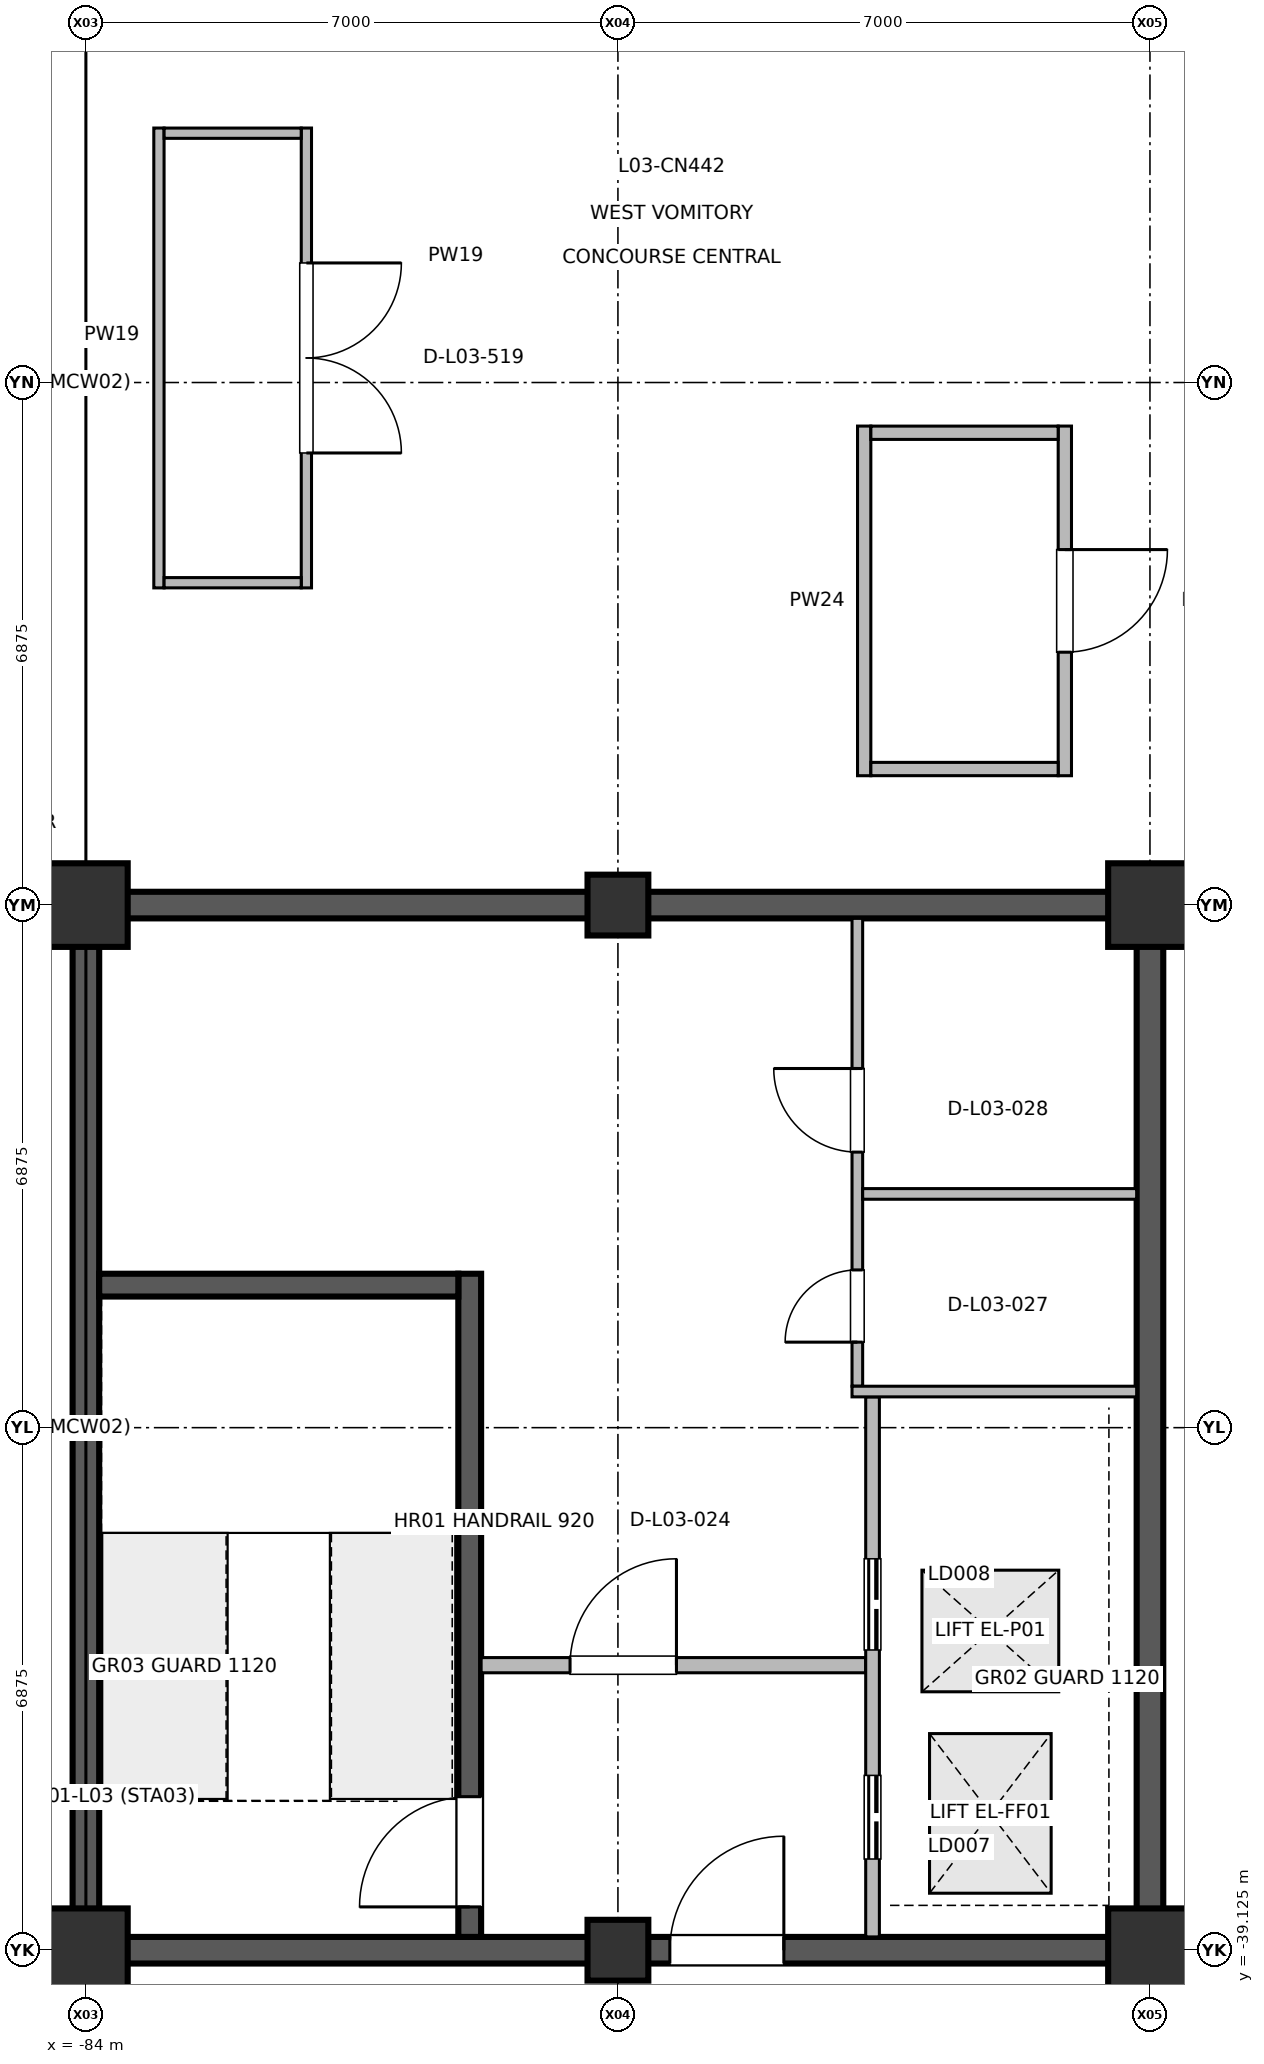
"""IFC4 building model, lengths in metres.
Left out: names, types, materials, properties, quantities, classifications, styles, units other than length and angle.
Written with IfcOpenShell. Run it as: python <this file> out.ifc"""

import sys

from ifc_helpers import new_model, si_unit, direction, frame, frame_2d, origin, origin_2d, place, context, subcontext, project, spatial, rectangle, extrude, element, fill, save


model = new_model("IFC4")
c1 = context("Model", 3, precision=1e-05, world=origin(), true_north=direction((0.0, 1.0)))
c2 = subcontext(c1, "Body", "Model", "MODEL_VIEW")
j1 = project(units=[si_unit("LENGTHUNIT", "METRE"), si_unit("PLANEANGLEUNIT", "RADIAN")], contexts=[c1])
p1 = place(None, origin())
s1 = spatial("IfcSite", under=j1, at=p1, CompositionType="ELEMENT")
p2 = place(p1, origin())
s2 = spatial("IfcBuilding", under=s1, at=p2, CompositionType="ELEMENT")
p3 = place(p2, frame((0.0, 0.0, 11.4)))
s3 = spatial("IfcBuildingStorey", under=s2, at=p3, CompositionType="ELEMENT", Elevation=11.4)
for number, where, z_axis, x_axis in (
    (1, (-84.0, -39.125, 0.0), (0.0, 0.0, 1.0), (1.0, 0.0, 0.0)),
    (2, (-84.0, -25.375, 0.0), (0.0, 0.0, 1.0), (1.0, 0.0, 0.0)),
):
    element("IfcColumn", number, at=place(p3, frame(where, z_axis=z_axis, x_axis=x_axis)), inside=s3, PredefinedType="COLUMN", context=c2, shape_type="SweptSolid", body=[
        extrude(rectangle(XDim=1.1, YDim=1.1, at=origin_2d()), origin(), (0.0, 0.0, 1.0), 4.798),
    ])
for number, where, z_axis, x_axis in (
    (3, (-77.0, -39.125, 0.0), (0.0, 0.0, 1.0), (1.0, 0.0, 0.0)),
    (4, (-77.0, -25.375, 0.0), (0.0, 0.0, 1.0), (1.0, 0.0, 0.0)),
):
    element("IfcColumn", number, at=place(p3, frame(where, z_axis=z_axis, x_axis=x_axis)), inside=s3, PredefinedType="COLUMN", context=c2, shape_type="SweptSolid", body=[
        extrude(rectangle(XDim=0.8, YDim=0.8, at=origin_2d()), origin(), (0.0, 0.0, 1.0), 4.798),
    ])
for number, where, z_axis, x_axis in (
    (5, (-70.0, -39.125, 0.0), (0.0, 0.0, 1.0), (1.0, 0.0, 0.0)),
    (6, (-70.0, -25.375, 0.0), (0.0, 0.0, 1.0), (1.0, 0.0, 0.0)),
):
    element("IfcColumn", number, at=place(p3, frame(where, z_axis=z_axis, x_axis=x_axis)), inside=s3, PredefinedType="COLUMN", context=c2, shape_type="SweptSolid", body=[
        extrude(rectangle(XDim=1.1, YDim=1.1, at=origin_2d()), origin(), (0.0, 0.0, 1.0), 4.798),
    ])
for number, where, z_axis, x_axis in (
    (7, (-84.0, -38.95, 0.0), (0.0, 0.0, 1.0), (0.0, 1.0, 0.0)),
    (8, (-70.0, -38.95, 0.0), (0.0, 0.0, 1.0), (0.0, 1.0, 0.0)),
):
    element("IfcWall", number, at=place(p3, frame(where, z_axis=z_axis, x_axis=x_axis)), inside=s3, PredefinedType="SHEAR", context=c2, shape_type="SweptSolid", body=[
        extrude(rectangle(XDim=13.4, YDim=0.35, at=frame_2d((6.7, 0.0))), origin(), (0.0, 0.0, 1.0), 4.58),
    ])
p4 = place(p3, frame((-83.825, -39.125, 0.0), z_axis=(0.0, 0.0, 1.0), x_axis=(1.0, 0.0, 0.0)))
e9 = element("IfcWall", 9, at=p4, inside=s3, PredefinedType="SHEAR", context=c2, shape_type="SweptSolid", body=[
    extrude(rectangle(XDim=13.65, YDim=0.35, at=frame_2d((6.825, 0.0))), origin(), (0.0, 0.0, 1.0), 4.58),
])
p5 = place(p4, frame((7.508, 0.0, 0.0)))
e10 = element("IfcOpeningElement", 10, at=p5, cuts=e9, PredefinedType="OPENING", context=c2, shape_type="SweptSolid", body=[
    extrude(rectangle(XDim=1.5, YDim=2.2, at=frame_2d((0.75, 1.1))), frame((0.0, 0.185, 0.0), z_axis=(0.0, -1.0, 0.0), x_axis=(1.0, 0.0, 0.0)), (0.0, 0.0, 1.0), 0.37),
])
p6 = place(p3, frame((-83.825, -25.375, 0.0), z_axis=(0.0, 0.0, 1.0), x_axis=(1.0, 0.0, 0.0)))
e11 = element("IfcWall", 11, at=p6, inside=s3, PredefinedType="SHEAR", context=c2, shape_type="SweptSolid", body=[
    extrude(rectangle(XDim=13.65, YDim=0.35, at=frame_2d((6.825, 0.0))), origin(), (0.0, 0.0, 1.0), 4.58),
])
p7 = place(p3, frame((-78.95, -38.95, 0.0), z_axis=(0.0, 0.0, 1.0), x_axis=(0.0, 1.0, 0.0)))
e12 = element("IfcWall", 12, at=p7, inside=s3, PredefinedType="SHEAR", context=c2, shape_type="SweptSolid", body=[
    extrude(rectangle(XDim=8.725, YDim=0.3, at=frame_2d((4.362, 0.0))), origin(), (0.0, 0.0, 1.0), 4.58),
])
p8 = place(p7, frame((0.395, 0.0, 0.0)))
e13 = element("IfcOpeningElement", 13, at=p8, cuts=e12, PredefinedType="OPENING", context=c2, shape_type="SweptSolid", body=[
    extrude(rectangle(XDim=1.45, YDim=2.2, at=frame_2d((0.725, 1.1))), frame((0.0, 0.16, 0.0), z_axis=(0.0, -1.0, 0.0), x_axis=(1.0, 0.0, 0.0)), (0.0, 0.0, 1.0), 0.32),
])
p9 = place(p3, frame((-78.8, -35.375, 0.0), z_axis=(0.0, 0.0, 1.0), x_axis=(1.0, 0.0, 0.0)))
e14 = element("IfcWall", 14, at=p9, inside=s3, PredefinedType="PARTITIONING", context=c2, shape_type="SweptSolid", body=[
    extrude(rectangle(XDim=5.06, YDim=0.2, at=frame_2d((2.53, 0.0))), origin(), (0.0, 0.0, 1.0), 3.82),
])
p10 = place(p9, frame((1.17, 0.0, 0.0)))
e15 = element("IfcOpeningElement", 15, at=p10, cuts=e14, PredefinedType="OPENING", context=c2, shape_type="SweptSolid", body=[
    extrude(rectangle(XDim=1.4, YDim=2.2, at=frame_2d((0.7, 1.1))), frame((0.0, 0.11, 0.0), z_axis=(0.0, -1.0, 0.0), x_axis=(1.0, 0.0, 0.0)), (0.0, 0.0, 1.0), 0.22),
])
p11 = place(p3, frame((-73.65, -38.95, 0.0), z_axis=(0.0, 0.0, 1.0), x_axis=(0.0, 1.0, 0.0)))
e16 = element("IfcWall", 16, at=p11, inside=s3, PredefinedType="PARTITIONING", context=c2, shape_type="SweptSolid", body=[
    extrude(rectangle(XDim=7.105, YDim=0.18, at=frame_2d((3.552, 0.0))), origin(), (0.0, 0.0, 1.0), 3.82),
])
p12 = place(p11, frame((1.025, 0.0, 0.0)))
e17 = element("IfcOpeningElement", 17, at=p12, cuts=e16, PredefinedType="OPENING", context=c2, shape_type="SweptSolid", body=[
    extrude(rectangle(XDim=1.1, YDim=2.2, at=frame_2d((0.55, 1.1))), frame((0.0, 0.1, 0.0), z_axis=(0.0, -1.0, 0.0), x_axis=(1.0, 0.0, 0.0)), (0.0, 0.0, 1.0), 0.2),
])
p13 = place(p11, frame((3.775, 0.0, 0.0)))
e18 = element("IfcOpeningElement", 18, at=p13, cuts=e16, PredefinedType="OPENING", context=c2, shape_type="SweptSolid", body=[
    extrude(rectangle(XDim=1.2, YDim=2.25, at=frame_2d((0.6, 1.125))), frame((0.0, 0.1, 0.0), z_axis=(0.0, -1.0, 0.0), x_axis=(1.0, 0.0, 0.0)), (0.0, 0.0, 1.0), 0.2),
])
p14 = place(p3, frame((-73.85, -31.705, 0.0), z_axis=(0.0, 0.0, 1.0), x_axis=(0.0, 1.0, 0.0)))
e19 = element("IfcWall", 19, at=p14, inside=s3, PredefinedType="PARTITIONING", context=c2, shape_type="SweptSolid", body=[
    extrude(rectangle(XDim=6.155, YDim=0.14, at=frame_2d((3.078, 0.0))), origin(), (0.0, 0.0, 1.0), 3.82),
])
p15 = place(p14, frame((0.58, 0.0, 0.0)))
e20 = element("IfcOpeningElement", 20, at=p15, cuts=e19, PredefinedType="OPENING", context=c2, shape_type="SweptSolid", body=[
    extrude(rectangle(XDim=0.95, YDim=2.15, at=frame_2d((0.475, 1.075))), frame((0.0, 0.08, 0.0), z_axis=(0.0, -1.0, 0.0), x_axis=(1.0, 0.0, 0.0)), (0.0, 0.0, 1.0), 0.16),
])
p16 = place(p14, frame((3.08, 0.0, 0.0)))
e21 = element("IfcOpeningElement", 21, at=p16, cuts=e19, PredefinedType="OPENING", context=c2, shape_type="SweptSolid", body=[
    extrude(rectangle(XDim=1.1, YDim=2.15, at=frame_2d((0.55, 1.075))), frame((0.0, 0.08, 0.0), z_axis=(0.0, -1.0, 0.0), x_axis=(1.0, 0.0, 0.0)), (0.0, 0.0, 1.0), 0.16),
])
p17 = place(p3, frame((-71.12, -19.073, 0.0), z_axis=(0.0, 0.0, 1.0), x_axis=(0.0, -1.0, 0.0)))
e22 = element("IfcWall", 22, at=p17, inside=s3, PredefinedType="PARTITIONING", context=c2, shape_type="SweptSolid", body=[
    extrude(rectangle(XDim=4.6, YDim=0.175, at=frame_2d((2.3, 0.0))), origin(), (0.0, 0.0, 1.0), 3.82),
])
p18 = place(p17, frame((1.625, 0.0, 0.0)))
e23 = element("IfcOpeningElement", 23, at=p18, cuts=e22, PredefinedType="OPENING", context=c2, shape_type="SweptSolid", body=[
    extrude(rectangle(XDim=1.35, YDim=2.2, at=frame_2d((0.675, 1.1))), frame((0.0, 0.097, 0.0), z_axis=(0.0, -1.0, 0.0), x_axis=(1.0, 0.0, 0.0)), (0.0, 0.0, 1.0), 0.195),
])
p19 = place(p3, frame((-81.099, -15.152, 0.0), z_axis=(0.0, 0.0, 1.0), x_axis=(0.0, -1.0, 0.0)))
e24 = element("IfcWall", 24, at=p19, inside=s3, PredefinedType="PARTITIONING", context=c2, shape_type="SweptSolid", body=[
    extrude(rectangle(XDim=6.05, YDim=0.135, at=frame_2d((3.025, 0.0))), origin(), (0.0, 0.0, 1.0), 3.82),
])
p20 = place(p19, frame((1.775, 0.0, 0.0)))
e25 = element("IfcOpeningElement", 25, at=p20, cuts=e24, PredefinedType="OPENING", context=c2, shape_type="SweptSolid", body=[
    extrude(rectangle(XDim=2.5, YDim=2.5, at=frame_2d((1.25, 1.25))), frame((0.0, 0.077, 0.0), z_axis=(0.0, -1.0, 0.0), x_axis=(1.0, 0.0, 0.0)), (0.0, 0.0, 1.0), 0.155),
])
p21 = place(p3, frame((-73.92, -31.775, 0.0), z_axis=(0.0, 0.0, 1.0), x_axis=(1.0, 0.0, 0.0)))
e26 = element("IfcWall", 26, at=p21, inside=s3, PredefinedType="PARTITIONING", context=c2, shape_type="SweptSolid", body=[
    extrude(rectangle(XDim=3.745, YDim=0.14, at=frame_2d((1.873, 0.0))), origin(), (0.0, 0.0, 1.0), 3.82),
])
p22 = place(p3, frame((-73.78, -29.175, 0.0), z_axis=(0.0, 0.0, 1.0), x_axis=(1.0, 0.0, 0.0)))
e27 = element("IfcWall", 27, at=p22, inside=s3, PredefinedType="PARTITIONING", context=c2, shape_type="SweptSolid", body=[
    extrude(rectangle(XDim=3.605, YDim=0.14, at=frame_2d((1.802, 0.0))), origin(), (0.0, 0.0, 1.0), 3.82),
])
p23 = place(p3, frame((-73.76, -23.673, 0.0), z_axis=(0.0, 0.0, 1.0), x_axis=(0.0, 1.0, 0.0)))
e28 = element("IfcWall", 28, at=p23, inside=s3, PredefinedType="PARTITIONING", context=c2, shape_type="SweptSolid", body=[
    extrude(rectangle(XDim=4.6, YDim=0.175, at=frame_2d((2.3, 0.0))), origin(), (0.0, 0.0, 1.0), 3.82),
])
for number, where, z_axis, x_axis in (
    (29, (-73.672, -23.585, 0.0), (0.0, 0.0, 1.0), (1.0, 0.0, 0.0)),
    (30, (-73.672, -19.161, 0.0), (0.0, 0.0, 1.0), (1.0, 0.0, 0.0)),
):
    element("IfcWall", number, at=place(p3, frame(where, z_axis=z_axis, x_axis=x_axis)), inside=s3, PredefinedType="PARTITIONING", context=c2, shape_type="SweptSolid", body=[
        extrude(rectangle(XDim=2.464, YDim=0.175, at=frame_2d((1.232, 0.0))), origin(), (0.0, 0.0, 1.0), 3.82),
    ])
p24 = place(p3, frame((-83.039, -21.202, 0.0), z_axis=(0.0, 0.0, 1.0), x_axis=(0.0, 1.0, 0.0)))
e31 = element("IfcWall", 31, at=p24, inside=s3, PredefinedType="PARTITIONING", context=c2, shape_type="SweptSolid", body=[
    extrude(rectangle(XDim=6.05, YDim=0.135, at=frame_2d((3.025, 0.0))), origin(), (0.0, 0.0, 1.0), 3.82),
])
for number, where, z_axis, x_axis in (
    (32, (-82.971, -21.134, 0.0), (0.0, 0.0, 1.0), (1.0, 0.0, 0.0)),
    (33, (-82.971, -15.22, 0.0), (0.0, 0.0, 1.0), (1.0, 0.0, 0.0)),
):
    element("IfcWall", number, at=place(p3, frame(where, z_axis=z_axis, x_axis=x_axis)), inside=s3, PredefinedType="PARTITIONING", context=c2, shape_type="SweptSolid", body=[
        extrude(rectangle(XDim=1.804, YDim=0.135, at=frame_2d((0.902, 0.0))), origin(), (0.0, 0.0, 1.0), 3.82),
    ])
p25 = place(p3, frame((-83.825, -30.375, 0.0), z_axis=(0.0, 0.0, 1.0), x_axis=(1.0, 0.0, 0.0)))
e34 = element("IfcWall", 34, at=p25, inside=s3, PredefinedType="SHEAR", context=c2, shape_type="SweptSolid", body=[
    extrude(rectangle(XDim=4.725, YDim=0.3, at=frame_2d((2.362, 0.0))), origin(), (0.0, 0.0, 1.0), 4.58),
])
p26 = place(p5, origin())
e35 = element("IfcDoor", 35, at=p26, inside=s3, OperationType="SINGLE_SWING_RIGHT", PredefinedType="DOOR", context=c2, shape_type="SweptSolid", body=[
    extrude(rectangle(XDim=1.5, YDim=2.2, at=frame_2d((0.75, 1.1))), frame((0.0, 0.025, 0.0), z_axis=(0.0, -1.0, 0.0), x_axis=(1.0, 0.0, 0.0)), (0.0, 0.0, 1.0), 0.05),
])
fill(e10, e35)
p27 = place(p8, origin())
e36 = element("IfcDoor", 36, at=p27, inside=s3, OperationType="SINGLE_SWING_LEFT", PredefinedType="DOOR", context=c2, shape_type="SweptSolid", body=[
    extrude(rectangle(XDim=1.45, YDim=2.2, at=frame_2d((0.725, 1.1))), frame((0.0, 0.025, 0.0), z_axis=(0.0, -1.0, 0.0), x_axis=(1.0, 0.0, 0.0)), (0.0, 0.0, 1.0), 0.05),
])
fill(e13, e36)
p28 = place(p10, origin())
e37 = element("IfcDoor", 37, at=p28, inside=s3, OperationType="SINGLE_SWING_RIGHT", PredefinedType="DOOR", context=c2, shape_type="SweptSolid", body=[
    extrude(rectangle(XDim=1.4, YDim=2.2, at=frame_2d((0.7, 1.1))), frame((0.0, 0.025, 0.0), z_axis=(0.0, -1.0, 0.0), x_axis=(1.0, 0.0, 0.0)), (0.0, 0.0, 1.0), 0.05),
])
fill(e15, e37)
p29 = place(p12, origin())
e38 = element("IfcDoor", 38, at=p29, inside=s3, OperationType="DOUBLE_DOOR_SLIDING", PredefinedType="DOOR", context=c2, shape_type="SweptSolid", body=[
    extrude(rectangle(XDim=1.1, YDim=2.2, at=frame_2d((0.55, 1.1))), frame((0.0, 0.025, 0.0), z_axis=(0.0, -1.0, 0.0), x_axis=(1.0, 0.0, 0.0)), (0.0, 0.0, 1.0), 0.05),
])
fill(e17, e38)
p30 = place(p13, origin())
e39 = element("IfcDoor", 39, at=p30, inside=s3, OperationType="DOUBLE_DOOR_SLIDING", PredefinedType="DOOR", context=c2, shape_type="SweptSolid", body=[
    extrude(rectangle(XDim=1.2, YDim=2.25, at=frame_2d((0.6, 1.125))), frame((0.0, 0.025, 0.0), z_axis=(0.0, -1.0, 0.0), x_axis=(1.0, 0.0, 0.0)), (0.0, 0.0, 1.0), 0.05),
])
fill(e18, e39)
p31 = place(p15, origin())
e40 = element("IfcDoor", 40, at=p31, inside=s3, OperationType="SINGLE_SWING_LEFT", PredefinedType="DOOR", context=c2, shape_type="SweptSolid", body=[
    extrude(rectangle(XDim=0.95, YDim=2.15, at=frame_2d((0.475, 1.075))), frame((0.0, 0.025, 0.0), z_axis=(0.0, -1.0, 0.0), x_axis=(1.0, 0.0, 0.0)), (0.0, 0.0, 1.0), 0.05),
])
fill(e20, e40)
p32 = place(p16, origin())
e41 = element("IfcDoor", 41, at=p32, inside=s3, OperationType="SINGLE_SWING_RIGHT", PredefinedType="DOOR", context=c2, shape_type="SweptSolid", body=[
    extrude(rectangle(XDim=1.1, YDim=2.15, at=frame_2d((0.55, 1.075))), frame((0.0, 0.025, 0.0), z_axis=(0.0, -1.0, 0.0), x_axis=(1.0, 0.0, 0.0)), (0.0, 0.0, 1.0), 0.05),
])
fill(e21, e41)
p33 = place(p18, origin())
e42 = element("IfcDoor", 42, at=p33, inside=s3, OperationType="SINGLE_SWING_LEFT", PredefinedType="DOOR", context=c2, shape_type="SweptSolid", body=[
    extrude(rectangle(XDim=1.35, YDim=2.2, at=frame_2d((0.675, 1.1))), frame((0.0, 0.025, 0.0), z_axis=(0.0, -1.0, 0.0), x_axis=(1.0, 0.0, 0.0)), (0.0, 0.0, 1.0), 0.05),
])
fill(e23, e42)
p34 = place(p20, origin())
e43 = element("IfcDoor", 43, at=p34, inside=s3, OperationType="DOUBLE_DOOR_SINGLE_SWING", PredefinedType="DOOR", context=c2, shape_type="SweptSolid", body=[
    extrude(rectangle(XDim=2.5, YDim=2.5, at=frame_2d((1.25, 1.25))), frame((0.0, 0.025, 0.0), z_axis=(0.0, -1.0, 0.0), x_axis=(1.0, 0.0, 0.0)), (0.0, 0.0, 1.0), 0.05),
])
fill(e25, e43)
save(model, sys.argv[1])
